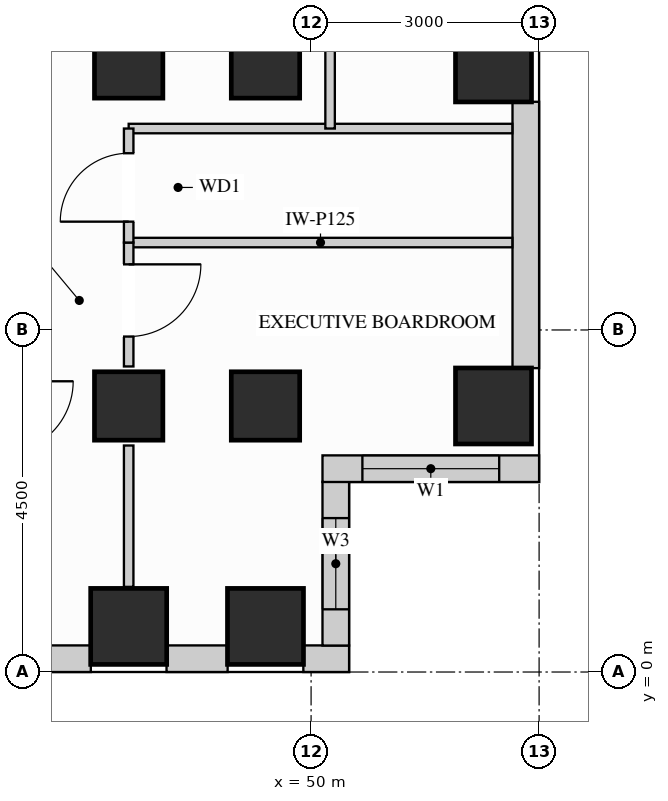
"""IFC4 building model, lengths in metres.
Left out: names, types, materials, properties, quantities, classifications, styles, units other than length and angle.
Written with IfcOpenShell. Run it as: python <this file> out.ifc"""

import sys

from ifc_helpers import new_model, si_unit, direction, frame, frame_2d, origin, origin_2d, place, context, subcontext, project, spatial, rectangle, extrude, source, transform, mapped, element, fill, save


model = new_model("IFC4")
c1 = context("Model", 3, precision=1e-05, world=origin(), true_north=direction((0.0, 1.0)))
c2 = subcontext(c1, "Body", "Model", "MODEL_VIEW")
j1 = project(units=[si_unit("LENGTHUNIT", "METRE"), si_unit("PLANEANGLEUNIT", "RADIAN")], contexts=[c1])
p1 = place(None, origin())
s1 = spatial("IfcSite", under=j1, at=p1, CompositionType="ELEMENT")
p2 = place(p1, origin())
s2 = spatial("IfcBuilding", under=s1, at=p2, CompositionType="ELEMENT")
p3 = place(p2, frame((0.0, 0.0, 146.7)))
s3 = spatial("IfcBuildingStorey", under=s2, at=p3, CompositionType="ELEMENT", Elevation=146.7)
m1 = source(origin(), c2, "Body", "SweptSolid", [
    extrude(rectangle(XDim=0.9, YDim=0.9, at=origin_2d()), origin(), (0.0, 0.0, 1.0), 3.4),
])
for number, where, z_axis, x_axis in (
    (1, (47.6, 3.5, 0.0), (0.0, 0.0, 1.0), (1.0, 0.0, 0.0)),
    (2, (47.6, 8.0, 0.0), (0.0, 0.0, 1.0), (1.0, 0.0, 0.0)),
    (3, (49.4, 3.5, 0.0), (0.0, 0.0, 1.0), (1.0, 0.0, 0.0)),
    (4, (49.4, 8.0, 0.0), (0.0, 0.0, 1.0), (1.0, 0.0, 0.0)),
):
    element("IfcColumn", number, at=place(p3, frame(where, z_axis=z_axis, x_axis=x_axis)), inside=s3, PredefinedType="COLUMN", context=c2, shape_type="MappedRepresentation", body=[
        mapped(m1, transform((0.0, 0.0, 0.0), x_axis=(1.0, 0.0, 0.0), y_axis=(0.0, 1.0, 0.0), z_axis=(0.0, 0.0, 1.0))),
    ])
m2 = source(origin(), c2, "Body", "SweptSolid", [
    extrude(rectangle(XDim=1.0, YDim=1.0, at=origin_2d()), origin(), (0.0, 0.0, 1.0), 3.4),
])
for number, where, z_axis, x_axis in (
    (5, (52.4, 3.5, 0.0), (0.0, 0.0, 1.0), (1.0, 0.0, 0.0)),
    (6, (52.4, 8.0, 0.0), (0.0, 0.0, 1.0), (1.0, 0.0, 0.0)),
    (7, (47.6, 0.6, 0.0), (0.0, 0.0, 1.0), (1.0, 0.0, 0.0)),
    (8, (49.4, 0.6, 0.0), (0.0, 0.0, 1.0), (1.0, 0.0, 0.0)),
):
    element("IfcColumn", number, at=place(p3, frame(where, z_axis=z_axis, x_axis=x_axis)), inside=s3, PredefinedType="COLUMN", context=c2, shape_type="MappedRepresentation", body=[
        mapped(m2, transform((0.0, 0.0, 0.0), x_axis=(1.0, 0.0, 0.0), y_axis=(0.0, 1.0, 0.0), z_axis=(0.0, 0.0, 1.0))),
    ])
p4 = place(p3, frame((40.498, 0.175, 0.0), z_axis=(0.0, 0.0, 1.0), x_axis=(1.0, 0.0, 0.0)))
e9 = element("IfcWall", 9, at=p4, inside=s3, PredefinedType="SOLIDWALL", context=c2, shape_type="SweptSolid", body=[
    extrude(rectangle(XDim=6.604, YDim=0.35, at=frame_2d((3.302, 0.0))), origin(), (0.0, 0.0, 1.0), 2.612),
])
p5 = place(p4, frame((0.737, 0.0, 0.78)))
e10 = element("IfcOpeningElement", 10, at=p5, cuts=e9, PredefinedType="OPENING", context=c2, shape_type="SweptSolid", body=[
    extrude(rectangle(XDim=1.8, YDim=1.652, at=frame_2d((0.9, 0.826))), frame((0.0, 0.185, 0.0), z_axis=(0.0, -1.0, 0.0), x_axis=(1.0, 0.0, 0.0)), (0.0, 0.0, 1.0), 0.37),
])
p6 = place(p4, frame((2.955, 0.0, 0.78)))
e11 = element("IfcOpeningElement", 11, at=p6, cuts=e9, PredefinedType="OPENING", context=c2, shape_type="SweptSolid", body=[
    extrude(rectangle(XDim=1.8, YDim=1.652, at=frame_2d((0.9, 0.826))), frame((0.0, 0.185, 0.0), z_axis=(0.0, -1.0, 0.0), x_axis=(1.0, 0.0, 0.0)), (0.0, 0.0, 1.0), 0.37),
])
m3 = source(origin(), c2, "Body", "SweptSolid", [
    extrude(rectangle(XDim=0.804, YDim=0.35, at=frame_2d((0.402, 0.0))), origin(), (0.0, 0.0, 1.0), 3.385),
])
p7 = place(p3, frame((48.098, 0.175, 0.0), z_axis=(0.0, 0.0, 1.0), x_axis=(1.0, 0.0, 0.0)))
e12 = element("IfcWall", 12, at=p7, inside=s3, PredefinedType="SOLIDWALL", context=c2, shape_type="MappedRepresentation", body=[
    mapped(m3, transform((0.0, 0.0, 0.0), x_axis=(1.0, 0.0, 0.0), y_axis=(0.0, 1.0, 0.0), z_axis=(0.0, 0.0, 1.0))),
])
m4 = source(origin(), c2, "Body", "SweptSolid", [
    extrude(rectangle(XDim=0.602, YDim=0.35, at=frame_2d((0.301, 0.0))), origin(), (0.0, 0.0, 1.0), 3.385),
])
p8 = place(p3, frame((49.898, 0.175, 0.0), z_axis=(0.0, 0.0, 1.0), x_axis=(1.0, 0.0, 0.0)))
e13 = element("IfcWall", 13, at=p8, inside=s3, PredefinedType="SOLIDWALL", context=c2, shape_type="MappedRepresentation", body=[
    mapped(m4, transform((0.0, 0.0, 0.0), x_axis=(1.0, 0.0, 0.0), y_axis=(0.0, 1.0, 0.0), z_axis=(0.0, 0.0, 1.0))),
])
p9 = place(p3, frame((50.325, 0.348, 0.0), z_axis=(0.0, 0.0, 1.0), x_axis=(0.0, 1.0, 0.0)))
e14 = element("IfcWall", 14, at=p9, inside=s3, PredefinedType="SOLIDWALL", context=c2, shape_type="SweptSolid", body=[
    extrude(rectangle(XDim=2.154, YDim=0.35, at=frame_2d((1.077, 0.0))), origin(), (0.0, 0.0, 1.0), 3.385),
])
p10 = place(p9, frame((0.477, 0.0, 0.78)))
e15 = element("IfcOpeningElement", 15, at=p10, cuts=e14, PredefinedType="OPENING", context=c2, shape_type="SweptSolid", body=[
    extrude(rectangle(XDim=1.2, YDim=2.1, at=frame_2d((0.6, 1.05))), frame((0.0, 0.185, 0.0), z_axis=(0.0, -1.0, 0.0), x_axis=(1.0, 0.0, 0.0)), (0.0, 0.0, 1.0), 0.37),
])
p11 = place(p3, frame((50.15, 2.675, 0.0), z_axis=(0.0, 0.0, 1.0), x_axis=(1.0, 0.0, 0.0)))
e16 = element("IfcWall", 16, at=p11, inside=s3, PredefinedType="SOLIDWALL", context=c2, shape_type="SweptSolid", body=[
    extrude(rectangle(XDim=2.85, YDim=0.35, at=frame_2d((1.425, 0.0))), origin(), (0.0, 0.0, 1.0), 3.385),
])
p12 = place(p11, frame((0.525, 0.0, 0.78)))
e17 = element("IfcOpeningElement", 17, at=p12, cuts=e16, PredefinedType="OPENING", context=c2, shape_type="SweptSolid", body=[
    extrude(rectangle(XDim=1.8, YDim=2.1, at=frame_2d((0.9, 1.05))), frame((0.0, 0.185, 0.0), z_axis=(0.0, -1.0, 0.0), x_axis=(1.0, 0.0, 0.0)), (0.0, 0.0, 1.0), 0.37),
])
m5 = source(origin(), c2, "Body", "SweptSolid", [
    extrude(rectangle(XDim=3.504, YDim=0.35, at=frame_2d((1.752, 0.0))), origin(), (0.0, 0.0, 1.0), 2.612),
])
p13 = place(p3, frame((52.825, 3.998, 0.0), z_axis=(0.0, 0.0, 1.0), x_axis=(0.0, 1.0, 0.0)))
e18 = element("IfcWall", 18, at=p13, inside=s3, PredefinedType="SOLIDWALL", context=c2, shape_type="MappedRepresentation", body=[
    mapped(m5, transform((0.0, 0.0, 0.0), x_axis=(1.0, 0.0, 0.0), y_axis=(0.0, 1.0, 0.0), z_axis=(0.0, 0.0, 1.0))),
])
m6 = source(origin(), c2, "Body", "SweptSolid", [
    extrude(rectangle(XDim=5.048, YDim=0.125, at=frame_2d((2.524, 0.0))), origin(), (0.0, 0.0, 1.0), 3.385),
])
for number, where, z_axis, x_axis in (
    (19, (47.6, 5.65, 0.0), (0.0, 0.0, 1.0), (1.0, 0.0, 0.0)),
    (20, (47.6, 7.15, 0.0), (0.0, 0.0, 1.0), (1.0, 0.0, 0.0)),
):
    element("IfcWall", number, at=place(p3, frame(where, z_axis=z_axis, x_axis=x_axis)), inside=s3, PredefinedType="PARTITIONING", context=c2, shape_type="MappedRepresentation", body=[
        mapped(m6, transform((0.0, 0.0, 0.0), x_axis=(1.0, 0.0, 0.0), y_axis=(0.0, 1.0, 0.0), z_axis=(0.0, 0.0, 1.0))),
    ])
m7 = source(origin(), c2, "Body", "SweptSolid", [
    extrude(rectangle(XDim=3.45, YDim=0.125, at=frame_2d((1.725, 0.0))), origin(), (0.0, 0.0, 1.0), 3.385),
])
p14 = place(p3, frame((50.25, 7.15, 0.0), z_axis=(0.0, 0.0, 1.0), x_axis=(0.0, 1.0, 0.0)))
e21 = element("IfcWall", 21, at=p14, inside=s3, PredefinedType="PARTITIONING", context=c2, shape_type="MappedRepresentation", body=[
    mapped(m7, transform((0.0, 0.0, 0.0), x_axis=(1.0, 0.0, 0.0), y_axis=(0.0, 1.0, 0.0), z_axis=(0.0, 0.0, 1.0))),
])
p15 = place(p3, frame((47.6, 4.02, 0.0), z_axis=(0.0, 0.0, 1.0), x_axis=(0.0, 1.0, 0.0)))
e22 = element("IfcWall", 22, at=p15, inside=s3, PredefinedType="PARTITIONING", context=c2, shape_type="SweptSolid", body=[
    extrude(rectangle(XDim=1.63, YDim=0.125, at=frame_2d((0.815, 0.0))), origin(), (0.0, 0.0, 1.0), 2.773),
])
p16 = place(p15, frame((0.393, 0.0, 0.0)))
e23 = element("IfcOpeningElement", 23, at=p16, cuts=e22, PredefinedType="OPENING", context=c2, shape_type="SweptSolid", body=[
    extrude(rectangle(XDim=0.95, YDim=2.15, at=frame_2d((0.475, 1.075))), frame((0.0, 0.073, 0.0), z_axis=(0.0, -1.0, 0.0), x_axis=(1.0, 0.0, 0.0)), (0.0, 0.0, 1.0), 0.145),
])
m8 = source(origin(), c2, "Body", "SweptSolid", [
    extrude(rectangle(XDim=1.86, YDim=0.125, at=frame_2d((0.93, 0.0))), origin(), (0.0, 0.0, 1.0), 2.773),
])
p17 = place(p3, frame((47.6, 1.12, 0.0), z_axis=(0.0, 0.0, 1.0), x_axis=(0.0, 1.0, 0.0)))
e24 = element("IfcWall", 24, at=p17, inside=s3, PredefinedType="PARTITIONING", context=c2, shape_type="MappedRepresentation", body=[
    mapped(m8, transform((0.0, 0.0, 0.0), x_axis=(1.0, 0.0, 0.0), y_axis=(0.0, 1.0, 0.0), z_axis=(0.0, 0.0, 1.0))),
])
p18 = place(p3, frame((47.6, 5.65, 0.0), z_axis=(0.0, 0.0, 1.0), x_axis=(0.0, 1.0, 0.0)))
e25 = element("IfcWall", 25, at=p18, inside=s3, PredefinedType="PARTITIONING", context=c2, shape_type="SweptSolid", body=[
    extrude(rectangle(XDim=1.5, YDim=0.125, at=frame_2d((0.75, 0.0))), origin(), (0.0, 0.0, 1.0), 2.773),
])
p19 = place(p18, frame((0.275, 0.0, 0.0)))
e26 = element("IfcOpeningElement", 26, at=p19, cuts=e25, PredefinedType="OPENING", context=c2, shape_type="SweptSolid", body=[
    extrude(rectangle(XDim=0.9, YDim=2.15, at=frame_2d((0.45, 1.075))), frame((0.0, 0.073, 0.0), z_axis=(0.0, -1.0, 0.0), x_axis=(1.0, 0.0, 0.0)), (0.0, 0.0, 1.0), 0.145),
])
m9 = source(origin(), c2, "Body", "SweptSolid", [
    extrude(rectangle(XDim=0.95, YDim=2.15, at=frame_2d((0.475, 1.075))), frame((0.0, 0.025, 0.0), z_axis=(0.0, -1.0, 0.0), x_axis=(1.0, 0.0, 0.0)), (0.0, 0.0, 1.0), 0.05),
])
p20 = place(p16, origin())
e27 = element("IfcDoor", 27, at=p20, inside=s3, OperationType="SINGLE_SWING_RIGHT", PredefinedType="DOOR", context=c2, shape_type="MappedRepresentation", body=[
    mapped(m9, transform((0.0, 0.0, 0.0), x_axis=(1.0, 0.0, 0.0), y_axis=(0.0, 1.0, 0.0), z_axis=(0.0, 0.0, 1.0))),
])
fill(e23, e27)
m10 = source(origin(), c2, "Body", "SweptSolid", [
    extrude(rectangle(XDim=0.9, YDim=2.15, at=frame_2d((0.45, 1.075))), frame((0.0, 0.025, 0.0), z_axis=(0.0, -1.0, 0.0), x_axis=(1.0, 0.0, 0.0)), (0.0, 0.0, 1.0), 0.05),
])
p21 = place(p19, origin())
e28 = element("IfcDoor", 28, at=p21, inside=s3, OperationType="SINGLE_SWING_LEFT", PredefinedType="DOOR", context=c2, shape_type="MappedRepresentation", body=[
    mapped(m10, transform((0.0, 0.0, 0.0), x_axis=(1.0, 0.0, 0.0), y_axis=(0.0, 1.0, 0.0), z_axis=(0.0, 0.0, 1.0))),
])
fill(e26, e28)
m11 = source(origin(), c2, "Body", "SweptSolid", [
    extrude(rectangle(XDim=1.8, YDim=2.1, at=frame_2d((0.9, 1.05))), frame((0.0, 0.03, 0.0), z_axis=(0.0, -1.0, 0.0), x_axis=(1.0, 0.0, 0.0)), (0.0, 0.0, 1.0), 0.06),
])
p22 = place(p12, origin())
e29 = element("IfcWindow", 29, at=p22, inside=s3, PartitioningType="SINGLE_PANEL", PredefinedType="WINDOW", context=c2, shape_type="MappedRepresentation", body=[
    mapped(m11, transform((0.0, 0.0, 0.0), x_axis=(1.0, 0.0, 0.0), y_axis=(0.0, 1.0, 0.0), z_axis=(0.0, 0.0, 1.0))),
])
fill(e17, e29)
m12 = source(origin(), c2, "Body", "SweptSolid", [
    extrude(rectangle(XDim=1.2, YDim=2.1, at=frame_2d((0.6, 1.05))), frame((0.0, 0.03, 0.0), z_axis=(0.0, -1.0, 0.0), x_axis=(1.0, 0.0, 0.0)), (0.0, 0.0, 1.0), 0.06),
])
p23 = place(p10, origin())
e30 = element("IfcWindow", 30, at=p23, inside=s3, PartitioningType="SINGLE_PANEL", PredefinedType="WINDOW", context=c2, shape_type="MappedRepresentation", body=[
    mapped(m12, transform((0.0, 0.0, 0.0), x_axis=(1.0, 0.0, 0.0), y_axis=(0.0, 1.0, 0.0), z_axis=(0.0, 0.0, 1.0))),
])
fill(e15, e30)
save(model, sys.argv[1])
